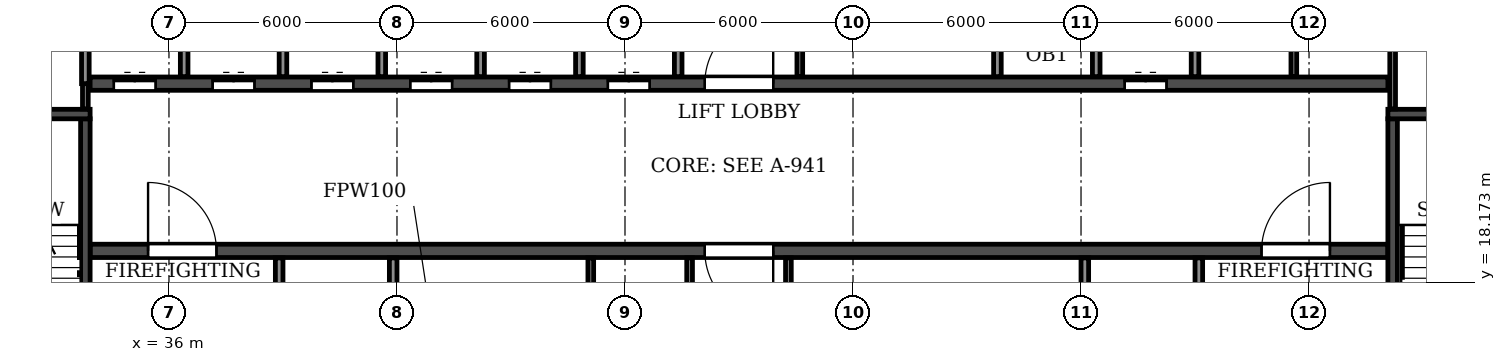
"""IFC4 building model, lengths in metres.
Left out: names, types, materials, properties, quantities, classifications, styles, units other than length and angle.
Written with IfcOpenShell. Run it as: python <this file> out.ifc"""

import sys

from ifc_helpers import new_model, si_unit, direction, frame, frame_2d, origin, place, context, subcontext, project, spatial, rectangle, extrude, element, fill, save


model = new_model("IFC4")
c1 = context("Model", 3, precision=1e-05, world=origin(), true_north=direction((0.0, 1.0)))
c2 = subcontext(c1, "Body", "Model", "MODEL_VIEW")
j1 = project(units=[si_unit("LENGTHUNIT", "METRE"), si_unit("PLANEANGLEUNIT", "RADIAN")], contexts=[c1])
p1 = place(None, origin())
s1 = spatial("IfcSite", under=j1, at=p1, CompositionType="ELEMENT")
p2 = place(p1, origin())
s2 = spatial("IfcBuilding", under=s1, at=p2, CompositionType="ELEMENT")
p3 = place(p2, frame((0.0, 0.0, 241.2)))
s3 = spatial("IfcBuildingStorey", under=s2, at=p3, CompositionType="ELEMENT", Elevation=241.2)
p4 = place(p3, frame((33.925, 19.0, 0.0), z_axis=(0.0, 0.0, 1.0), x_axis=(1.0, 0.0, 0.0)))
e1 = element("IfcWall", 1, at=p4, inside=s3, PredefinedType="SOLIDWALL", context=c2, shape_type="SweptSolid", body=[
    extrude(rectangle(XDim=34.15, YDim=0.35, at=frame_2d((17.075, 0.0))), origin(), (0.0, 0.0, 1.0), 3.08),
])
p5 = place(p4, frame((16.175, 0.0, 0.0)))
e2 = element("IfcOpeningElement", 2, at=p5, cuts=e1, PredefinedType="OPENING", context=c2, shape_type="SweptSolid", body=[
    extrude(rectangle(XDim=1.8, YDim=2.1, at=frame_2d((0.9, 1.05))), frame((0.0, 0.185, 0.0), z_axis=(0.0, -1.0, 0.0), x_axis=(1.0, 0.0, 0.0)), (0.0, 0.0, 1.0), 0.37),
])
p6 = place(p4, frame((1.525, 0.0, 0.0)))
e3 = element("IfcOpeningElement", 3, at=p6, cuts=e1, PredefinedType="OPENING", context=c2, shape_type="SweptSolid", body=[
    extrude(rectangle(XDim=1.8, YDim=2.1, at=frame_2d((0.9, 1.05))), frame((0.0, 0.185, 0.0), z_axis=(0.0, -1.0, 0.0), x_axis=(1.0, 0.0, 0.0)), (0.0, 0.0, 1.0), 0.37),
])
p7 = place(p4, frame((30.825, 0.0, 0.0)))
e4 = element("IfcOpeningElement", 4, at=p7, cuts=e1, PredefinedType="OPENING", context=c2, shape_type="SweptSolid", body=[
    extrude(rectangle(XDim=1.8, YDim=2.1, at=frame_2d((0.9, 1.05))), frame((0.0, 0.185, 0.0), z_axis=(0.0, -1.0, 0.0), x_axis=(1.0, 0.0, 0.0)), (0.0, 0.0, 1.0), 0.37),
])
p8 = place(p3, frame((33.925, 23.4, 0.0), z_axis=(0.0, 0.0, 1.0), x_axis=(1.0, 0.0, 0.0)))
e5 = element("IfcWall", 5, at=p8, inside=s3, PredefinedType="SOLIDWALL", context=c2, shape_type="SweptSolid", body=[
    extrude(rectangle(XDim=34.15, YDim=0.35, at=frame_2d((17.075, 0.0))), origin(), (0.0, 0.0, 1.0), 3.08),
])
p9 = place(p8, frame((16.175, 0.0, 0.0)))
e6 = element("IfcOpeningElement", 6, at=p9, cuts=e5, PredefinedType="OPENING", context=c2, shape_type="SweptSolid", body=[
    extrude(rectangle(XDim=1.8, YDim=2.1, at=frame_2d((0.9, 1.05))), frame((0.0, 0.185, 0.0), z_axis=(0.0, -1.0, 0.0), x_axis=(1.0, 0.0, 0.0)), (0.0, 0.0, 1.0), 0.37),
])
p10 = place(p8, frame((0.625, 0.0, 0.0)))
e7 = element("IfcOpeningElement", 7, at=p10, cuts=e5, PredefinedType="OPENING", context=c2, shape_type="SweptSolid", body=[
    extrude(rectangle(XDim=1.1, YDim=2.1, at=frame_2d((0.55, 1.05))), frame((0.0, 0.185, 0.0), z_axis=(0.0, -1.0, 0.0), x_axis=(1.0, 0.0, 0.0)), (0.0, 0.0, 1.0), 0.37),
])
p11 = place(p8, frame((3.225, 0.0, 0.0)))
e8 = element("IfcOpeningElement", 8, at=p11, cuts=e5, PredefinedType="OPENING", context=c2, shape_type="SweptSolid", body=[
    extrude(rectangle(XDim=1.1, YDim=2.1, at=frame_2d((0.55, 1.05))), frame((0.0, 0.185, 0.0), z_axis=(0.0, -1.0, 0.0), x_axis=(1.0, 0.0, 0.0)), (0.0, 0.0, 1.0), 0.37),
])
p12 = place(p8, frame((5.825, 0.0, 0.0)))
e9 = element("IfcOpeningElement", 9, at=p12, cuts=e5, PredefinedType="OPENING", context=c2, shape_type="SweptSolid", body=[
    extrude(rectangle(XDim=1.1, YDim=2.1, at=frame_2d((0.55, 1.05))), frame((0.0, 0.185, 0.0), z_axis=(0.0, -1.0, 0.0), x_axis=(1.0, 0.0, 0.0)), (0.0, 0.0, 1.0), 0.37),
])
p13 = place(p8, frame((8.425, 0.0, 0.0)))
e10 = element("IfcOpeningElement", 10, at=p13, cuts=e5, PredefinedType="OPENING", context=c2, shape_type="SweptSolid", body=[
    extrude(rectangle(XDim=1.1, YDim=2.1, at=frame_2d((0.55, 1.05))), frame((0.0, 0.185, 0.0), z_axis=(0.0, -1.0, 0.0), x_axis=(1.0, 0.0, 0.0)), (0.0, 0.0, 1.0), 0.37),
])
p14 = place(p8, frame((11.025, 0.0, 0.0)))
e11 = element("IfcOpeningElement", 11, at=p14, cuts=e5, PredefinedType="OPENING", context=c2, shape_type="SweptSolid", body=[
    extrude(rectangle(XDim=1.1, YDim=2.1, at=frame_2d((0.55, 1.05))), frame((0.0, 0.185, 0.0), z_axis=(0.0, -1.0, 0.0), x_axis=(1.0, 0.0, 0.0)), (0.0, 0.0, 1.0), 0.37),
])
p15 = place(p8, frame((13.625, 0.0, 0.0)))
e12 = element("IfcOpeningElement", 12, at=p15, cuts=e5, PredefinedType="OPENING", context=c2, shape_type="SweptSolid", body=[
    extrude(rectangle(XDim=1.1, YDim=2.1, at=frame_2d((0.55, 1.05))), frame((0.0, 0.185, 0.0), z_axis=(0.0, -1.0, 0.0), x_axis=(1.0, 0.0, 0.0)), (0.0, 0.0, 1.0), 0.37),
])
p16 = place(p8, frame((27.225, 0.0, 0.0)))
e13 = element("IfcOpeningElement", 13, at=p16, cuts=e5, PredefinedType="OPENING", context=c2, shape_type="SweptSolid", body=[
    extrude(rectangle(XDim=1.1, YDim=2.1, at=frame_2d((0.55, 1.05))), frame((0.0, 0.185, 0.0), z_axis=(0.0, -1.0, 0.0), x_axis=(1.0, 0.0, 0.0)), (0.0, 0.0, 1.0), 0.37),
])
p17 = place(p3, frame((33.8, 14.775, 0.0), z_axis=(0.0, 0.0, 1.0), x_axis=(0.0, 1.0, 0.0)))
e14 = element("IfcWall", 14, at=p17, inside=s3, PredefinedType="SOLIDWALL", context=c2, shape_type="SweptSolid", body=[
    extrude(rectangle(XDim=7.7, YDim=0.25, at=frame_2d((3.85, 0.0))), origin(), (0.0, 0.0, 1.0), 3.08),
])
p18 = place(p17, frame((0.525, 0.0, 0.0)))
e15 = element("IfcOpeningElement", 15, at=p18, cuts=e14, PredefinedType="OPENING", context=c2, shape_type="SweptSolid", body=[
    extrude(rectangle(XDim=1.0, YDim=2.1, at=frame_2d((0.5, 1.05))), frame((0.0, 0.135, 0.0), z_axis=(0.0, -1.0, 0.0), x_axis=(1.0, 0.0, 0.0)), (0.0, 0.0, 1.0), 0.27),
])
p19 = place(p3, frame((29.875, 22.6, 0.0), z_axis=(0.0, 0.0, 1.0), x_axis=(1.0, 0.0, 0.0)))
e16 = element("IfcWall", 16, at=p19, inside=s3, PredefinedType="SOLIDWALL", context=c2, shape_type="SweptSolid", body=[
    extrude(rectangle(XDim=4.05, YDim=0.25, at=frame_2d((2.025, 0.0))), origin(), (0.0, 0.0, 1.0), 3.08),
])
p20 = place(p3, frame((68.2, 14.775, 0.0), z_axis=(0.0, 0.0, 1.0), x_axis=(0.0, 1.0, 0.0)))
e17 = element("IfcWall", 17, at=p20, inside=s3, PredefinedType="SOLIDWALL", context=c2, shape_type="SweptSolid", body=[
    extrude(rectangle(XDim=7.7, YDim=0.25, at=frame_2d((3.85, 0.0))), origin(), (0.0, 0.0, 1.0), 3.08),
])
p21 = place(p20, frame((0.525, 0.0, 0.0)))
e18 = element("IfcOpeningElement", 18, at=p21, cuts=e17, PredefinedType="OPENING", context=c2, shape_type="SweptSolid", body=[
    extrude(rectangle(XDim=1.0, YDim=2.1, at=frame_2d((0.5, 1.05))), frame((0.0, 0.135, 0.0), z_axis=(0.0, -1.0, 0.0), x_axis=(1.0, 0.0, 0.0)), (0.0, 0.0, 1.0), 0.27),
])
p22 = place(p3, frame((68.075, 22.6, 0.0), z_axis=(0.0, 0.0, 1.0), x_axis=(1.0, 0.0, 0.0)))
e19 = element("IfcWall", 19, at=p22, inside=s3, PredefinedType="SOLIDWALL", context=c2, shape_type="SweptSolid", body=[
    extrude(rectangle(XDim=4.05, YDim=0.25, at=frame_2d((2.025, 0.0))), origin(), (0.0, 0.0, 1.0), 3.08),
])
for number, where, z_axis, x_axis in (
    (20, (49.7, 14.785, 0.0), (0.0, 0.0, 1.0), (0.0, 1.0, 0.0)),
    (21, (52.3, 14.785, 0.0), (0.0, 0.0, 1.0), (0.0, 1.0, 0.0)),
    (22, (52.6, 23.585, 0.0), (0.0, 0.0, 1.0), (0.0, 1.0, 0.0)),
    (23, (47.1, 14.785, 0.0), (0.0, 0.0, 1.0), (0.0, 1.0, 0.0)),
    (24, (65.6, 23.585, 0.0), (0.0, 0.0, 1.0), (0.0, 1.0, 0.0)),
):
    element("IfcWall", number, at=place(p3, frame(where, z_axis=z_axis, x_axis=x_axis)), inside=s3, PredefinedType="PARTITIONING", context=c2, shape_type="SweptSolid", body=[
        extrude(rectangle(XDim=4.03, YDim=0.15, at=frame_2d((2.015, 0.0))), origin(), (0.0, 0.0, 1.0), 3.08),
    ])
p23 = place(p3, frame((33.8, 22.735, 0.0), z_axis=(0.0, 0.0, 1.0), x_axis=(0.0, 1.0, 0.0)))
e25 = element("IfcWall", 25, at=p23, inside=s3, PredefinedType="PARTITIONING", context=c2, shape_type="SweptSolid", body=[
    extrude(rectangle(XDim=0.665, YDim=0.15, at=frame_2d((0.333, 0.0))), origin(), (0.0, 0.0, 1.0), 3.08),
])
p24 = place(p3, frame((68.2, 22.735, 0.0), z_axis=(0.0, 0.0, 1.0), x_axis=(0.0, 1.0, 0.0)))
e26 = element("IfcWall", 26, at=p24, inside=s3, PredefinedType="PARTITIONING", context=c2, shape_type="SweptSolid", body=[
    extrude(rectangle(XDim=4.88, YDim=0.15, at=frame_2d((2.44, 0.0))), origin(), (0.0, 0.0, 1.0), 3.08),
])
p25 = place(p3, frame((33.8, 23.4, 0.0), z_axis=(0.0, 0.0, 1.0), x_axis=(0.0, 1.0, 0.0)))
e27 = element("IfcWall", 27, at=p25, inside=s3, PredefinedType="PARTITIONING", context=c2, shape_type="SweptSolid", body=[
    extrude(rectangle(XDim=2.7, YDim=0.2, at=frame_2d((1.35, 0.0))), origin(), (0.0, 0.0, 1.0), 3.08),
])
p26 = place(p3, frame((36.4, 23.585, 0.0), z_axis=(0.0, 0.0, 1.0), x_axis=(0.0, 1.0, 0.0)))
e28 = element("IfcWall", 28, at=p26, inside=s3, PredefinedType="PARTITIONING", context=c2, shape_type="SweptSolid", body=[
    extrude(rectangle(XDim=2.515, YDim=0.2, at=frame_2d((1.258, 0.0))), origin(), (0.0, 0.0, 1.0), 3.08),
])
p27 = place(p3, frame((38.9, 14.785, 0.0), z_axis=(0.0, 0.0, 1.0), x_axis=(0.0, 1.0, 0.0)))
e29 = element("IfcWall", 29, at=p27, inside=s3, PredefinedType="PARTITIONING", context=c2, shape_type="SweptSolid", body=[
    extrude(rectangle(XDim=4.03, YDim=0.2, at=frame_2d((2.015, 0.0))), origin(), (0.0, 0.0, 1.0), 3.08),
])
p28 = place(p27, frame((1.465, 0.0, 0.0)))
e30 = element("IfcOpeningElement", 30, at=p28, cuts=e29, PredefinedType="OPENING", context=c2, shape_type="SweptSolid", body=[
    extrude(rectangle(XDim=1.1, YDim=2.1, at=frame_2d((0.55, 1.05))), frame((0.0, 0.11, 0.0), z_axis=(0.0, -1.0, 0.0), x_axis=(1.0, 0.0, 0.0)), (0.0, 0.0, 1.0), 0.22),
])
for number, where, z_axis, x_axis in (
    (31, (39.0, 23.585, 0.0), (0.0, 0.0, 1.0), (0.0, 1.0, 0.0)),
    (32, (41.6, 23.585, 0.0), (0.0, 0.0, 1.0), (0.0, 1.0, 0.0)),
):
    element("IfcWall", number, at=place(p3, frame(where, z_axis=z_axis, x_axis=x_axis)), inside=s3, PredefinedType="PARTITIONING", context=c2, shape_type="SweptSolid", body=[
        extrude(rectangle(XDim=2.515, YDim=0.2, at=frame_2d((1.258, 0.0))), origin(), (0.0, 0.0, 1.0), 3.08),
    ])
for number, where, z_axis, x_axis in (
    (33, (41.9, 14.785, 0.0), (0.0, 0.0, 1.0), (0.0, 1.0, 0.0)),
    (34, (44.2, 23.585, 0.0), (0.0, 0.0, 1.0), (0.0, 1.0, 0.0)),
    (35, (46.8, 23.585, 0.0), (0.0, 0.0, 1.0), (0.0, 1.0, 0.0)),
):
    element("IfcWall", number, at=place(p3, frame(where, z_axis=z_axis, x_axis=x_axis)), inside=s3, PredefinedType="PARTITIONING", context=c2, shape_type="SweptSolid", body=[
        extrude(rectangle(XDim=4.03, YDim=0.2, at=frame_2d((2.015, 0.0))), origin(), (0.0, 0.0, 1.0), 3.08),
    ])
for number, where, z_axis, x_axis in (
    (36, (49.4, 23.585, 0.0), (0.0, 0.0, 1.0), (0.0, 1.0, 0.0)),
    (37, (57.8, 23.585, 0.0), (0.0, 0.0, 1.0), (0.0, 1.0, 0.0)),
):
    element("IfcWall", number, at=place(p3, frame(where, z_axis=z_axis, x_axis=x_axis)), inside=s3, PredefinedType="PARTITIONING", context=c2, shape_type="SweptSolid", body=[
        extrude(rectangle(XDim=2.515, YDim=0.2, at=frame_2d((1.258, 0.0))), origin(), (0.0, 0.0, 1.0), 3.08),
    ])
p29 = place(p3, frame((60.1, 14.785, 0.0), z_axis=(0.0, 0.0, 1.0), x_axis=(0.0, 1.0, 0.0)))
e38 = element("IfcWall", 38, at=p29, inside=s3, PredefinedType="PARTITIONING", context=c2, shape_type="SweptSolid", body=[
    extrude(rectangle(XDim=4.03, YDim=0.2, at=frame_2d((2.015, 0.0))), origin(), (0.0, 0.0, 1.0), 3.08),
])
for number, where, z_axis, x_axis in (
    (39, (60.4, 23.585, 0.0), (0.0, 0.0, 1.0), (0.0, 1.0, 0.0)),
    (40, (63.0, 23.585, 0.0), (0.0, 0.0, 1.0), (0.0, 1.0, 0.0)),
):
    element("IfcWall", number, at=place(p3, frame(where, z_axis=z_axis, x_axis=x_axis)), inside=s3, PredefinedType="PARTITIONING", context=c2, shape_type="SweptSolid", body=[
        extrude(rectangle(XDim=2.515, YDim=0.2, at=frame_2d((1.258, 0.0))), origin(), (0.0, 0.0, 1.0), 3.08),
    ])
p30 = place(p3, frame((63.1, 14.785, 0.0), z_axis=(0.0, 0.0, 1.0), x_axis=(0.0, 1.0, 0.0)))
e41 = element("IfcWall", 41, at=p30, inside=s3, PredefinedType="PARTITIONING", context=c2, shape_type="SweptSolid", body=[
    extrude(rectangle(XDim=4.03, YDim=0.2, at=frame_2d((2.015, 0.0))), origin(), (0.0, 0.0, 1.0), 3.08),
])
p31 = place(p30, frame((1.465, 0.0, 0.0)))
e42 = element("IfcOpeningElement", 42, at=p31, cuts=e41, PredefinedType="OPENING", context=c2, shape_type="SweptSolid", body=[
    extrude(rectangle(XDim=1.1, YDim=2.1, at=frame_2d((0.55, 1.05))), frame((0.0, 0.11, 0.0), z_axis=(0.0, -1.0, 0.0), x_axis=(1.0, 0.0, 0.0)), (0.0, 0.0, 1.0), 0.22),
])
p32 = place(p9, origin())
e43 = element("IfcDoor", 43, at=p32, inside=s3, OperationType="DOUBLE_DOOR_SINGLE_SWING", PredefinedType="DOOR", context=c2, shape_type="SweptSolid", body=[
    extrude(rectangle(XDim=1.8, YDim=2.1, at=frame_2d((0.9, 1.05))), frame((0.0, 0.025, 0.0), z_axis=(0.0, -1.0, 0.0), x_axis=(1.0, 0.0, 0.0)), (0.0, 0.0, 1.0), 0.05),
])
fill(e6, e43)
p33 = place(p5, frame((1.8, 0.0, 0.0), z_axis=(0.0, 0.0, 1.0), x_axis=(-1.0, 0.0, 0.0)))
e44 = element("IfcDoor", 44, at=p33, inside=s3, OperationType="DOUBLE_DOOR_SINGLE_SWING", PredefinedType="DOOR", context=c2, shape_type="SweptSolid", body=[
    extrude(rectangle(XDim=1.8, YDim=2.1, at=frame_2d((0.9, 1.05))), frame((0.0, 0.025, 0.0), z_axis=(0.0, -1.0, 0.0), x_axis=(1.0, 0.0, 0.0)), (0.0, 0.0, 1.0), 0.05),
])
fill(e2, e44)
p34 = place(p10, origin())
e45 = element("IfcDoor", 45, at=p34, inside=s3, OperationType="DOUBLE_DOOR_SLIDING", PredefinedType="DOOR", context=c2, shape_type="SweptSolid", body=[
    extrude(rectangle(XDim=1.1, YDim=2.1, at=frame_2d((0.55, 1.05))), frame((0.0, 0.025, 0.0), z_axis=(0.0, -1.0, 0.0), x_axis=(1.0, 0.0, 0.0)), (0.0, 0.0, 1.0), 0.05),
])
fill(e7, e45)
p35 = place(p6, origin())
e46 = element("IfcDoor", 46, at=p35, inside=s3, OperationType="DOUBLE_DOOR_SINGLE_SWING", PredefinedType="DOOR", context=c2, shape_type="SweptSolid", body=[
    extrude(rectangle(XDim=1.8, YDim=2.1, at=frame_2d((0.9, 1.05))), frame((0.0, 0.025, 0.0), z_axis=(0.0, -1.0, 0.0), x_axis=(1.0, 0.0, 0.0)), (0.0, 0.0, 1.0), 0.05),
])
fill(e3, e46)
p36 = place(p11, origin())
e47 = element("IfcDoor", 47, at=p36, inside=s3, OperationType="DOUBLE_DOOR_SLIDING", PredefinedType="DOOR", context=c2, shape_type="SweptSolid", body=[
    extrude(rectangle(XDim=1.1, YDim=2.1, at=frame_2d((0.55, 1.05))), frame((0.0, 0.025, 0.0), z_axis=(0.0, -1.0, 0.0), x_axis=(1.0, 0.0, 0.0)), (0.0, 0.0, 1.0), 0.05),
])
fill(e8, e47)
p37 = place(p12, origin())
e48 = element("IfcDoor", 48, at=p37, inside=s3, OperationType="DOUBLE_DOOR_SLIDING", PredefinedType="DOOR", context=c2, shape_type="SweptSolid", body=[
    extrude(rectangle(XDim=1.1, YDim=2.1, at=frame_2d((0.55, 1.05))), frame((0.0, 0.025, 0.0), z_axis=(0.0, -1.0, 0.0), x_axis=(1.0, 0.0, 0.0)), (0.0, 0.0, 1.0), 0.05),
])
fill(e9, e48)
p38 = place(p13, origin())
e49 = element("IfcDoor", 49, at=p38, inside=s3, OperationType="DOUBLE_DOOR_SLIDING", PredefinedType="DOOR", context=c2, shape_type="SweptSolid", body=[
    extrude(rectangle(XDim=1.1, YDim=2.1, at=frame_2d((0.55, 1.05))), frame((0.0, 0.025, 0.0), z_axis=(0.0, -1.0, 0.0), x_axis=(1.0, 0.0, 0.0)), (0.0, 0.0, 1.0), 0.05),
])
fill(e10, e49)
p39 = place(p14, origin())
e50 = element("IfcDoor", 50, at=p39, inside=s3, OperationType="DOUBLE_DOOR_SLIDING", PredefinedType="DOOR", context=c2, shape_type="SweptSolid", body=[
    extrude(rectangle(XDim=1.1, YDim=2.1, at=frame_2d((0.55, 1.05))), frame((0.0, 0.025, 0.0), z_axis=(0.0, -1.0, 0.0), x_axis=(1.0, 0.0, 0.0)), (0.0, 0.0, 1.0), 0.05),
])
fill(e11, e50)
p40 = place(p15, origin())
e51 = element("IfcDoor", 51, at=p40, inside=s3, OperationType="DOUBLE_DOOR_SLIDING", PredefinedType="DOOR", context=c2, shape_type="SweptSolid", body=[
    extrude(rectangle(XDim=1.1, YDim=2.1, at=frame_2d((0.55, 1.05))), frame((0.0, 0.025, 0.0), z_axis=(0.0, -1.0, 0.0), x_axis=(1.0, 0.0, 0.0)), (0.0, 0.0, 1.0), 0.05),
])
fill(e12, e51)
p41 = place(p16, origin())
e52 = element("IfcDoor", 52, at=p41, inside=s3, OperationType="DOUBLE_DOOR_SLIDING", PredefinedType="DOOR", context=c2, shape_type="SweptSolid", body=[
    extrude(rectangle(XDim=1.1, YDim=2.1, at=frame_2d((0.55, 1.05))), frame((0.0, 0.025, 0.0), z_axis=(0.0, -1.0, 0.0), x_axis=(1.0, 0.0, 0.0)), (0.0, 0.0, 1.0), 0.05),
])
fill(e13, e52)
p42 = place(p7, origin())
e53 = element("IfcDoor", 53, at=p42, inside=s3, OperationType="DOUBLE_DOOR_SINGLE_SWING", PredefinedType="DOOR", context=c2, shape_type="SweptSolid", body=[
    extrude(rectangle(XDim=1.8, YDim=2.1, at=frame_2d((0.9, 1.05))), frame((0.0, 0.025, 0.0), z_axis=(0.0, -1.0, 0.0), x_axis=(1.0, 0.0, 0.0)), (0.0, 0.0, 1.0), 0.05),
])
fill(e4, e53)
save(model, sys.argv[1])
